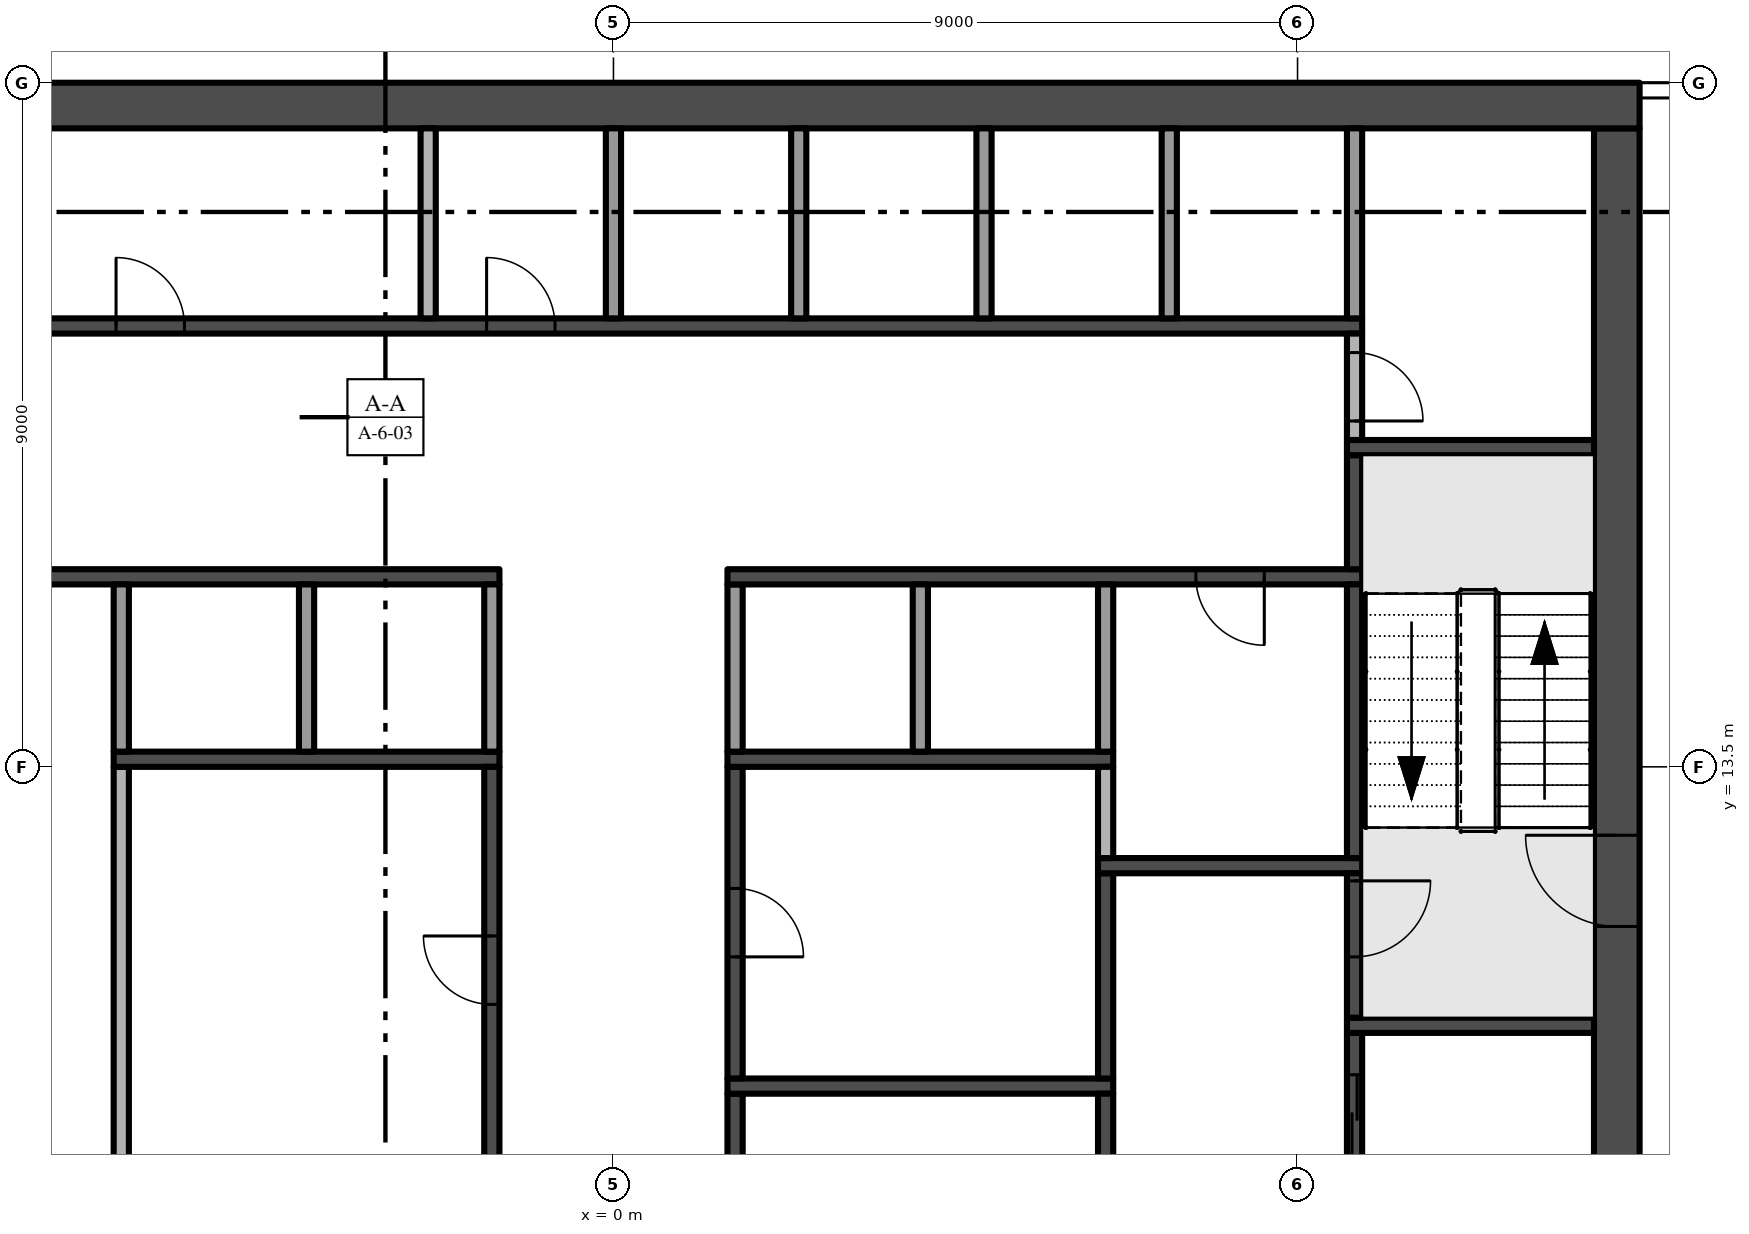
"""IFC4 building model, lengths in metres.
Left out: names, types, materials, properties, quantities, classifications, styles, units other than length and angle.
Written with IfcOpenShell. Run it as: python <this file> out.ifc"""

import sys

from ifc_helpers import new_model, si_unit, direction, frame, frame_2d, origin, place, context, subcontext, project, spatial, rectangle, extrude, element, fill, save


model = new_model("IFC4")
c1 = context("Model", 3, precision=1e-05, world=origin(), true_north=direction((0.0, 1.0)))
c2 = subcontext(c1, "Body", "Model", "MODEL_VIEW")
j1 = project(units=[si_unit("LENGTHUNIT", "METRE"), si_unit("PLANEANGLEUNIT", "RADIAN")], contexts=[c1])
p1 = place(None, origin())
s1 = spatial("IfcSite", under=j1, at=p1, CompositionType="ELEMENT")
p2 = place(p1, origin())
s2 = spatial("IfcBuilding", under=s1, at=p2, CompositionType="ELEMENT")
p3 = place(p2, frame((0.0, 0.0, 289.4)))
s3 = spatial("IfcBuildingStorey", under=s2, at=p3, CompositionType="ELEMENT", Elevation=289.4)
p4 = place(p3, frame((13.2, 5.1, -0.3), z_axis=(0.0, 0.0, 1.0), x_axis=(0.0, 1.0, 0.0)))
e1 = element("IfcWall", 1, at=p4, inside=s3, PredefinedType="SHEAR", context=c2, shape_type="SweptSolid", body=[
    extrude(rectangle(XDim=16.8, YDim=0.6, at=frame_2d((8.4, 0.0))), origin(), (0.0, 0.0, 1.0), 8.0),
])
p5 = place(p4, frame((6.3, 0.0, 0.3)))
e2 = element("IfcOpeningElement", 2, at=p5, cuts=e1, PredefinedType="OPENING", context=c2, shape_type="SweptSolid", body=[
    extrude(rectangle(XDim=1.2, YDim=2.2, at=frame_2d((0.6, 1.1))), frame((0.0, 0.31, 0.0), z_axis=(0.0, -1.0, 0.0), x_axis=(1.0, 0.0, 0.0)), (0.0, 0.0, 1.0), 0.62),
])
p6 = place(p3, frame((13.5, 22.2, -0.3), z_axis=(0.0, 0.0, 1.0), x_axis=(-1.0, 0.0, 0.0)))
e3 = element("IfcWall", 3, at=p6, inside=s3, PredefinedType="SHEAR", context=c2, shape_type="SweptSolid", body=[
    extrude(rectangle(XDim=27.0, YDim=0.6, at=frame_2d((13.5, 0.0))), origin(), (0.0, 0.0, 1.0), 8.0),
])
p7 = place(p3, frame((-1.5, 16.0, 0.0), z_axis=(0.0, 0.0, 1.0), x_axis=(-1.0, 0.0, 0.0)))
e4 = element("IfcWall", 4, at=p7, inside=s3, PredefinedType="SHEAR", context=c2, shape_type="SweptSolid", body=[
    extrude(rectangle(XDim=8.35, YDim=0.2, at=frame_2d((4.175, 0.0))), origin(), (0.0, 0.0, 1.0), 7.7),
])
p8 = place(p7, frame((6.162, 0.0, 0.0)))
e5 = element("IfcOpeningElement", 5, at=p8, cuts=e4, PredefinedType="OPENING", context=c2, shape_type="SweptSolid", body=[
    extrude(rectangle(XDim=0.9, YDim=2.1, at=frame_2d((0.45, 1.05))), frame((0.0, 0.11, 0.0), z_axis=(0.0, -1.0, 0.0), x_axis=(1.0, 0.0, 0.0)), (0.0, 0.0, 1.0), 0.22),
])
p9 = place(p3, frame((-9.85, 19.3, 0.0), z_axis=(0.0, 0.0, 1.0), x_axis=(1.0, 0.0, 0.0)))
e6 = element("IfcWall", 6, at=p9, inside=s3, PredefinedType="SHEAR", context=c2, shape_type="SweptSolid", body=[
    extrude(rectangle(XDim=19.7, YDim=0.2, at=frame_2d((9.85, 0.0))), origin(), (0.0, 0.0, 1.0), 7.7),
])
p10 = place(p9, frame((3.306, 0.0, 0.0)))
e7 = element("IfcOpeningElement", 7, at=p10, cuts=e6, PredefinedType="OPENING", context=c2, shape_type="SweptSolid", body=[
    extrude(rectangle(XDim=0.9, YDim=2.1, at=frame_2d((0.45, 1.05))), frame((0.0, 0.11, 0.0), z_axis=(0.0, -1.0, 0.0), x_axis=(1.0, 0.0, 0.0)), (0.0, 0.0, 1.0), 0.22),
])
p11 = place(p9, frame((8.181, 0.0, 0.0)))
e8 = element("IfcOpeningElement", 8, at=p11, cuts=e6, PredefinedType="OPENING", context=c2, shape_type="SweptSolid", body=[
    extrude(rectangle(XDim=0.9, YDim=2.1, at=frame_2d((0.45, 1.05))), frame((0.0, 0.11, 0.0), z_axis=(0.0, -1.0, 0.0), x_axis=(1.0, 0.0, 0.0)), (0.0, 0.0, 1.0), 0.22),
])
p12 = place(p3, frame((-6.475, 8.15, 0.0), z_axis=(0.0, 0.0, 1.0), x_axis=(0.0, 1.0, 0.0)))
e9 = element("IfcWall", 9, at=p12, inside=s3, PredefinedType="PARTITIONING", context=c2, shape_type="SweptSolid", body=[
    extrude(rectangle(XDim=5.35, YDim=0.2, at=frame_2d((2.675, 0.0))), origin(), (0.0, 0.0, 1.0), 7.7),
])
p13 = place(p3, frame((-6.575, 13.6, 0.0), z_axis=(0.0, 0.0, 1.0), x_axis=(1.0, 0.0, 0.0)))
e10 = element("IfcWall", 10, at=p13, inside=s3, PredefinedType="SHEAR", context=c2, shape_type="SweptSolid", body=[
    extrude(rectangle(XDim=5.075, YDim=0.2, at=frame_2d((2.538, 0.0))), origin(), (0.0, 0.0, 1.0), 7.7),
])
for number, where, z_axis, x_axis in (
    (11, (-6.475, 13.7, 0.0), (0.0, 0.0, 1.0), (0.0, 1.0, 0.0)),
    (12, (-4.037, 13.7, 0.0), (0.0, 0.0, 1.0), (0.0, 1.0, 0.0)),
):
    element("IfcWall", number, at=place(p3, frame(where, z_axis=z_axis, x_axis=x_axis)), inside=s3, PredefinedType="PARTITIONING", context=c2, shape_type="SweptSolid", body=[
        extrude(rectangle(XDim=2.2, YDim=0.2, at=frame_2d((1.1, 0.0))), origin(), (0.0, 0.0, 1.0), 7.7),
    ])
p14 = place(p3, frame((-2.438, 19.4, 0.0), z_axis=(0.0, 0.0, 1.0), x_axis=(0.0, 1.0, 0.0)))
e13 = element("IfcWall", 13, at=p14, inside=s3, PredefinedType="PARTITIONING", context=c2, shape_type="SweptSolid", body=[
    extrude(rectangle(XDim=2.5, YDim=0.2, at=frame_2d((1.25, 0.0))), origin(), (0.0, 0.0, 1.0), 7.7),
])
p15 = place(p3, frame((-1.6, 8.15, 0.0), z_axis=(0.0, 0.0, 1.0), x_axis=(0.0, 1.0, 0.0)))
e14 = element("IfcWall", 14, at=p15, inside=s3, PredefinedType="SHEAR", context=c2, shape_type="SweptSolid", body=[
    extrude(rectangle(XDim=5.35, YDim=0.2, at=frame_2d((2.675, 0.0))), origin(), (0.0, 0.0, 1.0), 7.7),
])
p16 = place(p15, frame((2.225, 0.0, 0.0)))
e15 = element("IfcOpeningElement", 15, at=p16, cuts=e14, PredefinedType="OPENING", context=c2, shape_type="SweptSolid", body=[
    extrude(rectangle(XDim=0.9, YDim=2.1, at=frame_2d((0.45, 1.05))), frame((0.0, 0.11, 0.0), z_axis=(0.0, -1.0, 0.0), x_axis=(1.0, 0.0, 0.0)), (0.0, 0.0, 1.0), 0.22),
])
p17 = place(p3, frame((-1.6, 13.7, 0.0), z_axis=(0.0, 0.0, 1.0), x_axis=(0.0, 1.0, 0.0)))
e16 = element("IfcWall", 16, at=p17, inside=s3, PredefinedType="PARTITIONING", context=c2, shape_type="SweptSolid", body=[
    extrude(rectangle(XDim=2.2, YDim=0.2, at=frame_2d((1.1, 0.0))), origin(), (0.0, 0.0, 1.0), 7.7),
])
p18 = place(p3, frame((0.0, 19.4, 0.0), z_axis=(0.0, 0.0, 1.0), x_axis=(0.0, 1.0, 0.0)))
e17 = element("IfcWall", 17, at=p18, inside=s3, PredefinedType="PARTITIONING", context=c2, shape_type="SweptSolid", body=[
    extrude(rectangle(XDim=2.5, YDim=0.2, at=frame_2d((1.25, 0.0))), origin(), (0.0, 0.0, 1.0), 7.7),
])
p19 = place(p3, frame((1.6, 9.2, 0.0), z_axis=(0.0, 0.0, 1.0), x_axis=(0.0, -1.0, 0.0)))
e18 = element("IfcWall", 18, at=p19, inside=s3, PredefinedType="SHEAR", context=c2, shape_type="SweptSolid", body=[
    extrude(rectangle(XDim=4.1, YDim=0.2, at=frame_2d((2.05, 0.0))), origin(), (0.0, 0.0, 1.0), 7.7),
])
p20 = place(p19, frame((1.2, 0.0, 0.0)))
e19 = element("IfcOpeningElement", 19, at=p20, cuts=e18, PredefinedType="OPENING", context=c2, shape_type="SweptSolid", body=[
    extrude(rectangle(XDim=0.9, YDim=2.1, at=frame_2d((0.45, 1.05))), frame((0.0, 0.11, 0.0), z_axis=(0.0, -1.0, 0.0), x_axis=(1.0, 0.0, 0.0)), (0.0, 0.0, 1.0), 0.22),
])
p21 = place(p3, frame((1.5, 9.3, 0.0), z_axis=(0.0, 0.0, 1.0), x_axis=(1.0, 0.0, 0.0)))
e20 = element("IfcWall", 20, at=p21, inside=s3, PredefinedType="SHEAR", context=c2, shape_type="SweptSolid", body=[
    extrude(rectangle(XDim=5.075, YDim=0.2, at=frame_2d((2.538, 0.0))), origin(), (0.0, 0.0, 1.0), 7.7),
])
p22 = place(p3, frame((1.6, 13.5, 0.0), z_axis=(0.0, 0.0, 1.0), x_axis=(0.0, -1.0, 0.0)))
e21 = element("IfcWall", 21, at=p22, inside=s3, PredefinedType="SHEAR", context=c2, shape_type="SweptSolid", body=[
    extrude(rectangle(XDim=4.1, YDim=0.2, at=frame_2d((2.05, 0.0))), origin(), (0.0, 0.0, 1.0), 7.7),
])
p23 = place(p22, frame((1.6, 0.0, 0.0)))
e22 = element("IfcOpeningElement", 22, at=p23, cuts=e21, PredefinedType="OPENING", context=c2, shape_type="SweptSolid", body=[
    extrude(rectangle(XDim=0.9, YDim=2.1, at=frame_2d((0.45, 1.05))), frame((0.0, 0.11, 0.0), z_axis=(0.0, -1.0, 0.0), x_axis=(1.0, 0.0, 0.0)), (0.0, 0.0, 1.0), 0.22),
])
p24 = place(p3, frame((1.5, 13.6, 0.0), z_axis=(0.0, 0.0, 1.0), x_axis=(1.0, 0.0, 0.0)))
e23 = element("IfcWall", 23, at=p24, inside=s3, PredefinedType="SHEAR", context=c2, shape_type="SweptSolid", body=[
    extrude(rectangle(XDim=5.075, YDim=0.2, at=frame_2d((2.538, 0.0))), origin(), (0.0, 0.0, 1.0), 7.7),
])
p25 = place(p3, frame((1.6, 13.7, 0.0), z_axis=(0.0, 0.0, 1.0), x_axis=(0.0, 1.0, 0.0)))
e24 = element("IfcWall", 24, at=p25, inside=s3, PredefinedType="PARTITIONING", context=c2, shape_type="SweptSolid", body=[
    extrude(rectangle(XDim=2.2, YDim=0.2, at=frame_2d((1.1, 0.0))), origin(), (0.0, 0.0, 1.0), 7.7),
])
p26 = place(p3, frame((9.85, 16.0, 0.0), z_axis=(0.0, 0.0, 1.0), x_axis=(-1.0, 0.0, 0.0)))
e25 = element("IfcWall", 25, at=p26, inside=s3, PredefinedType="SHEAR", context=c2, shape_type="SweptSolid", body=[
    extrude(rectangle(XDim=8.35, YDim=0.2, at=frame_2d((4.175, 0.0))), origin(), (0.0, 0.0, 1.0), 7.7),
])
p27 = place(p26, frame((1.288, 0.0, 0.0)))
e26 = element("IfcOpeningElement", 26, at=p27, cuts=e25, PredefinedType="OPENING", context=c2, shape_type="SweptSolid", body=[
    extrude(rectangle(XDim=0.9, YDim=2.1, at=frame_2d((0.45, 1.05))), frame((0.0, 0.11, 0.0), z_axis=(0.0, -1.0, 0.0), x_axis=(1.0, 0.0, 0.0)), (0.0, 0.0, 1.0), 0.22),
])
p28 = place(p3, frame((2.438, 19.4, 0.0), z_axis=(0.0, 0.0, 1.0), x_axis=(0.0, 1.0, 0.0)))
e27 = element("IfcWall", 27, at=p28, inside=s3, PredefinedType="PARTITIONING", context=c2, shape_type="SweptSolid", body=[
    extrude(rectangle(XDim=2.5, YDim=0.2, at=frame_2d((1.25, 0.0))), origin(), (0.0, 0.0, 1.0), 7.7),
])
p29 = place(p3, frame((4.037, 13.7, 0.0), z_axis=(0.0, 0.0, 1.0), x_axis=(0.0, 1.0, 0.0)))
e28 = element("IfcWall", 28, at=p29, inside=s3, PredefinedType="PARTITIONING", context=c2, shape_type="SweptSolid", body=[
    extrude(rectangle(XDim=2.2, YDim=0.2, at=frame_2d((1.1, 0.0))), origin(), (0.0, 0.0, 1.0), 7.7),
])
p30 = place(p3, frame((4.875, 19.4, 0.0), z_axis=(0.0, 0.0, 1.0), x_axis=(0.0, 1.0, 0.0)))
e29 = element("IfcWall", 29, at=p30, inside=s3, PredefinedType="PARTITIONING", context=c2, shape_type="SweptSolid", body=[
    extrude(rectangle(XDim=2.5, YDim=0.2, at=frame_2d((1.25, 0.0))), origin(), (0.0, 0.0, 1.0), 7.7),
])
p31 = place(p3, frame((6.475, 5.1, 0.0), z_axis=(0.0, 0.0, 1.0), x_axis=(0.0, 1.0, 0.0)))
e30 = element("IfcWall", 30, at=p31, inside=s3, PredefinedType="SHEAR", context=c2, shape_type="SweptSolid", body=[
    extrude(rectangle(XDim=4.1, YDim=0.2, at=frame_2d((2.05, 0.0))), origin(), (0.0, 0.0, 1.0), 7.7),
])
p32 = place(p3, frame((6.475, 9.4, 0.0), z_axis=(0.0, 0.0, 1.0), x_axis=(0.0, 1.0, 0.0)))
e31 = element("IfcWall", 31, at=p32, inside=s3, PredefinedType="SHEAR", context=c2, shape_type="SweptSolid", body=[
    extrude(rectangle(XDim=2.7, YDim=0.2, at=frame_2d((1.35, 0.0))), origin(), (0.0, 0.0, 1.0), 7.7),
])
p33 = place(p3, frame((6.375, 12.2, 0.0), z_axis=(0.0, 0.0, 1.0), x_axis=(1.0, 0.0, 0.0)))
e32 = element("IfcWall", 32, at=p33, inside=s3, PredefinedType="SHEAR", context=c2, shape_type="SweptSolid", body=[
    extrude(rectangle(XDim=3.475, YDim=0.2, at=frame_2d((1.738, 0.0))), origin(), (0.0, 0.0, 1.0), 7.7),
])
p34 = place(p3, frame((6.475, 12.3, 0.0), z_axis=(0.0, 0.0, 1.0), x_axis=(0.0, 1.0, 0.0)))
e33 = element("IfcWall", 33, at=p34, inside=s3, PredefinedType="PARTITIONING", context=c2, shape_type="SweptSolid", body=[
    extrude(rectangle(XDim=1.2, YDim=0.2, at=frame_2d((0.6, 0.0))), origin(), (0.0, 0.0, 1.0), 7.7),
])
p35 = place(p3, frame((6.475, 13.7, 0.0), z_axis=(0.0, 0.0, 1.0), x_axis=(0.0, 1.0, 0.0)))
e34 = element("IfcWall", 34, at=p35, inside=s3, PredefinedType="PARTITIONING", context=c2, shape_type="SweptSolid", body=[
    extrude(rectangle(XDim=2.2, YDim=0.2, at=frame_2d((1.1, 0.0))), origin(), (0.0, 0.0, 1.0), 7.7),
])
p36 = place(p3, frame((7.312, 19.4, 0.0), z_axis=(0.0, 0.0, 1.0), x_axis=(0.0, 1.0, 0.0)))
e35 = element("IfcWall", 35, at=p36, inside=s3, PredefinedType="PARTITIONING", context=c2, shape_type="SweptSolid", body=[
    extrude(rectangle(XDim=2.5, YDim=0.2, at=frame_2d((1.25, 0.0))), origin(), (0.0, 0.0, 1.0), 7.7),
])
p37 = place(p3, frame((9.75, 7.8, 0.0), z_axis=(0.0, 0.0, 1.0), x_axis=(0.0, 1.0, 0.0)))
e36 = element("IfcWall", 36, at=p37, inside=s3, PredefinedType="SHEAR", context=c2, shape_type="SweptSolid", body=[
    extrude(rectangle(XDim=2.2, YDim=0.2, at=frame_2d((1.1, 0.0))), origin(), (0.0, 0.0, 1.0), 7.7),
])
p38 = place(p37, frame((0.55, 0.0, 0.0)))
e37 = element("IfcOpeningElement", 37, at=p38, cuts=e36, PredefinedType="OPENING", context=c2, shape_type="SweptSolid", body=[
    extrude(rectangle(XDim=1.1, YDim=2.1, at=frame_2d((0.55, 1.05))), frame((0.0, 0.11, 0.0), z_axis=(0.0, -1.0, 0.0), x_axis=(1.0, 0.0, 0.0)), (0.0, 0.0, 1.0), 0.22),
])
p39 = place(p3, frame((9.65, 10.1, 0.0), z_axis=(0.0, 0.0, 1.0), x_axis=(1.0, 0.0, 0.0)))
e38 = element("IfcWall", 38, at=p39, inside=s3, PredefinedType="SHEAR", context=c2, shape_type="SweptSolid", body=[
    extrude(rectangle(XDim=3.25, YDim=0.2, at=frame_2d((1.625, 0.0))), origin(), (0.0, 0.0, 1.0), 7.7),
])
p40 = place(p3, frame((9.75, 12.1, 0.0), z_axis=(0.0, 0.0, 1.0), x_axis=(0.0, -1.0, 0.0)))
e39 = element("IfcWall", 39, at=p40, inside=s3, PredefinedType="SHEAR", context=c2, shape_type="SweptSolid", body=[
    extrude(rectangle(XDim=1.9, YDim=0.2, at=frame_2d((0.95, 0.0))), origin(), (0.0, 0.0, 1.0), 7.7),
])
p41 = place(p40, frame((0.1, 0.0, 0.0)))
e40 = element("IfcOpeningElement", 40, at=p41, cuts=e39, PredefinedType="OPENING", context=c2, shape_type="SweptSolid", body=[
    extrude(rectangle(XDim=1.0, YDim=2.2, at=frame_2d((0.5, 1.1))), frame((0.0, 0.11, 0.0), z_axis=(0.0, -1.0, 0.0), x_axis=(1.0, 0.0, 0.0)), (0.0, 0.0, 1.0), 0.22),
])
p42 = place(p3, frame((9.75, 12.3, 0.0), z_axis=(0.0, 0.0, 1.0), x_axis=(0.0, 1.0, 0.0)))
e41 = element("IfcWall", 41, at=p42, inside=s3, PredefinedType="SHEAR", context=c2, shape_type="SweptSolid", body=[
    extrude(rectangle(XDim=3.6, YDim=0.2, at=frame_2d((1.8, 0.0))), origin(), (0.0, 0.0, 1.0), 7.7),
])
p43 = place(p3, frame((9.75, 16.1, 0.0), z_axis=(0.0, 0.0, 1.0), x_axis=(0.0, 1.0, 0.0)))
e42 = element("IfcWall", 42, at=p43, inside=s3, PredefinedType="SHEAR", context=c2, shape_type="SweptSolid", body=[
    extrude(rectangle(XDim=1.5, YDim=0.2, at=frame_2d((0.75, 0.0))), origin(), (0.0, 0.0, 1.0), 7.7),
])
p44 = place(p3, frame((9.65, 17.7, 0.0), z_axis=(0.0, 0.0, 1.0), x_axis=(1.0, 0.0, 0.0)))
e43 = element("IfcWall", 43, at=p44, inside=s3, PredefinedType="SHEAR", context=c2, shape_type="SweptSolid", body=[
    extrude(rectangle(XDim=3.25, YDim=0.2, at=frame_2d((1.625, 0.0))), origin(), (0.0, 0.0, 1.0), 7.7),
])
p45 = place(p3, frame((9.75, 19.2, 0.0), z_axis=(0.0, 0.0, 1.0), x_axis=(0.0, -1.0, 0.0)))
e44 = element("IfcWall", 44, at=p45, inside=s3, PredefinedType="PARTITIONING", context=c2, shape_type="SweptSolid", body=[
    extrude(rectangle(XDim=1.4, YDim=0.2, at=frame_2d((0.7, 0.0))), origin(), (0.0, 0.0, 1.0), 7.7),
])
p46 = place(p45, frame((0.25, 0.0, 0.0)))
e45 = element("IfcOpeningElement", 45, at=p46, cuts=e44, PredefinedType="OPENING", context=c2, shape_type="SweptSolid", body=[
    extrude(rectangle(XDim=0.9, YDim=2.1, at=frame_2d((0.45, 1.05))), frame((0.0, 0.11, 0.0), z_axis=(0.0, -1.0, 0.0), x_axis=(1.0, 0.0, 0.0)), (0.0, 0.0, 1.0), 0.22),
])
p47 = place(p3, frame((9.75, 19.4, 0.0), z_axis=(0.0, 0.0, 1.0), x_axis=(0.0, 1.0, 0.0)))
e46 = element("IfcWall", 46, at=p47, inside=s3, PredefinedType="PARTITIONING", context=c2, shape_type="SweptSolid", body=[
    extrude(rectangle(XDim=2.5, YDim=0.2, at=frame_2d((1.25, 0.0))), origin(), (0.0, 0.0, 1.0), 7.7),
])
p48 = place(p5, frame((1.2, 0.0, 0.0), z_axis=(0.0, 0.0, 1.0), x_axis=(-1.0, 0.0, 0.0)))
e47 = element("IfcDoor", 47, at=p48, inside=s3, OperationType="SINGLE_SWING_LEFT", PredefinedType="DOOR", context=c2, shape_type="SweptSolid", body=[
    extrude(rectangle(XDim=1.2, YDim=2.2, at=frame_2d((0.6, 1.1))), frame((0.0, 0.025, 0.0), z_axis=(0.0, -1.0, 0.0), x_axis=(1.0, 0.0, 0.0)), (0.0, 0.0, 1.0), 0.05),
])
fill(e2, e47)
p49 = place(p41, origin())
e48 = element("IfcDoor", 48, at=p49, inside=s3, OperationType="SINGLE_SWING_LEFT", PredefinedType="DOOR", context=c2, shape_type="SweptSolid", body=[
    extrude(rectangle(XDim=1.0, YDim=2.2, at=frame_2d((0.5, 1.1))), frame((0.0, 0.025, 0.0), z_axis=(0.0, -1.0, 0.0), x_axis=(1.0, 0.0, 0.0)), (0.0, 0.0, 1.0), 0.05),
])
fill(e40, e48)
p50 = place(p38, origin())
e49 = element("IfcDoor", 49, at=p50, inside=s3, OperationType="SLIDING_TO_RIGHT", PredefinedType="DOOR", context=c2, shape_type="SweptSolid", body=[
    extrude(rectangle(XDim=1.1, YDim=2.1, at=frame_2d((0.55, 1.05))), frame((0.0, 0.025, 0.0), z_axis=(0.0, -1.0, 0.0), x_axis=(1.0, 0.0, 0.0)), (0.0, 0.0, 1.0), 0.05),
])
fill(e37, e49)
p51 = place(p16, origin())
e50 = element("IfcDoor", 50, at=p51, inside=s3, OperationType="SINGLE_SWING_RIGHT", PredefinedType="DOOR", context=c2, shape_type="SweptSolid", body=[
    extrude(rectangle(XDim=0.9, YDim=2.1, at=frame_2d((0.45, 1.05))), frame((0.0, 0.025, 0.0), z_axis=(0.0, -1.0, 0.0), x_axis=(1.0, 0.0, 0.0)), (0.0, 0.0, 1.0), 0.05),
])
fill(e15, e50)
p52 = place(p23, origin())
e51 = element("IfcDoor", 51, at=p52, inside=s3, OperationType="SINGLE_SWING_RIGHT", PredefinedType="DOOR", context=c2, shape_type="SweptSolid", body=[
    extrude(rectangle(XDim=0.9, YDim=2.1, at=frame_2d((0.45, 1.05))), frame((0.0, 0.025, 0.0), z_axis=(0.0, -1.0, 0.0), x_axis=(1.0, 0.0, 0.0)), (0.0, 0.0, 1.0), 0.05),
])
fill(e22, e51)
p53 = place(p27, origin())
e52 = element("IfcDoor", 52, at=p53, inside=s3, OperationType="SINGLE_SWING_LEFT", PredefinedType="DOOR", context=c2, shape_type="SweptSolid", body=[
    extrude(rectangle(XDim=0.9, YDim=2.1, at=frame_2d((0.45, 1.05))), frame((0.0, 0.025, 0.0), z_axis=(0.0, -1.0, 0.0), x_axis=(1.0, 0.0, 0.0)), (0.0, 0.0, 1.0), 0.05),
])
fill(e26, e52)
p54 = place(p46, origin())
e53 = element("IfcDoor", 53, at=p54, inside=s3, OperationType="SINGLE_SWING_RIGHT", PredefinedType="DOOR", context=c2, shape_type="SweptSolid", body=[
    extrude(rectangle(XDim=0.9, YDim=2.1, at=frame_2d((0.45, 1.05))), frame((0.0, 0.025, 0.0), z_axis=(0.0, -1.0, 0.0), x_axis=(1.0, 0.0, 0.0)), (0.0, 0.0, 1.0), 0.05),
])
fill(e45, e53)
p55 = place(p10, origin())
e54 = element("IfcDoor", 54, at=p55, inside=s3, OperationType="SINGLE_SWING_LEFT", PredefinedType="DOOR", context=c2, shape_type="SweptSolid", body=[
    extrude(rectangle(XDim=0.9, YDim=2.1, at=frame_2d((0.45, 1.05))), frame((0.0, 0.025, 0.0), z_axis=(0.0, -1.0, 0.0), x_axis=(1.0, 0.0, 0.0)), (0.0, 0.0, 1.0), 0.05),
])
fill(e7, e54)
p56 = place(p11, origin())
e55 = element("IfcDoor", 55, at=p56, inside=s3, OperationType="SINGLE_SWING_LEFT", PredefinedType="DOOR", context=c2, shape_type="SweptSolid", body=[
    extrude(rectangle(XDim=0.9, YDim=2.1, at=frame_2d((0.45, 1.05))), frame((0.0, 0.025, 0.0), z_axis=(0.0, -1.0, 0.0), x_axis=(1.0, 0.0, 0.0)), (0.0, 0.0, 1.0), 0.05),
])
fill(e8, e55)
save(model, sys.argv[1])
